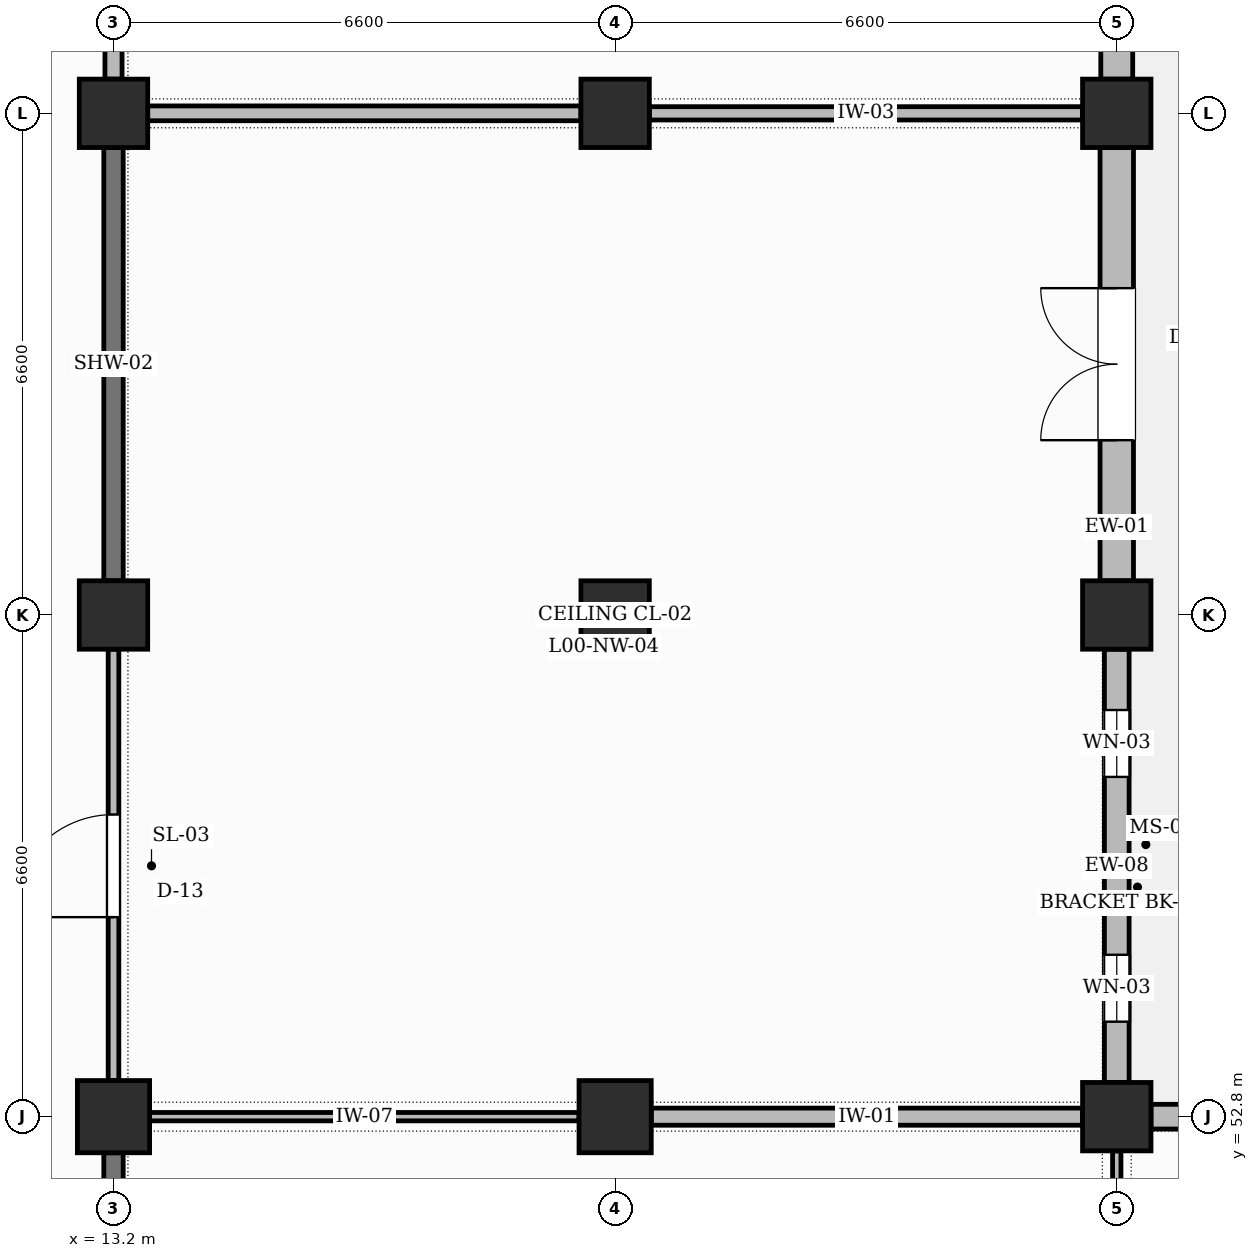
"""IFC4 building model, lengths in metres.
Left out: names, types, materials, properties, quantities, classifications, styles, units other than length and angle.
Written with IfcOpenShell. Run it as: python <this file> out.ifc"""

import sys

from ifc_helpers import new_model, si_unit, direction, frame, frame_2d, origin, origin_2d, place, context, subcontext, project, spatial, rectangle, extrude, element, fill, save


model = new_model("IFC4")
c1 = context("Model", 3, precision=1e-05, world=origin(), true_north=direction((0.0, 1.0)))
c2 = subcontext(c1, "Body", "Model", "MODEL_VIEW")
j1 = project(units=[si_unit("LENGTHUNIT", "METRE"), si_unit("PLANEANGLEUNIT", "RADIAN")], contexts=[c1])
p1 = place(None, origin())
s1 = spatial("IfcSite", under=j1, at=p1, CompositionType="ELEMENT")
p2 = place(p1, origin())
s2 = spatial("IfcBuilding", under=s1, at=p2, CompositionType="ELEMENT")
p3 = place(p2, origin())
s3 = spatial("IfcBuildingStorey", under=s2, at=p3, CompositionType="ELEMENT", Elevation=0.0)
p4 = place(p3, frame((13.2, 52.8, 0.0), z_axis=(0.0, 0.0, 1.0), x_axis=(1.0, 0.0, 0.0)))
e1 = element("IfcColumn", 1, at=p4, inside=s3, PredefinedType="COLUMN", context=c2, shape_type="SweptSolid", body=[
    extrude(rectangle(XDim=0.95, YDim=0.95, at=origin_2d()), origin(), (0.0, 0.0, 1.0), 5.4),
])
for number, where, z_axis, x_axis in (
    (2, (13.2, 59.4, 0.0), (0.0, 0.0, 1.0), (1.0, 0.0, 0.0)),
    (3, (13.2, 66.0, 0.0), (0.0, 0.0, 1.0), (1.0, 0.0, 0.0)),
):
    element("IfcColumn", number, at=place(p3, frame(where, z_axis=z_axis, x_axis=x_axis)), inside=s3, PredefinedType="COLUMN", context=c2, shape_type="SweptSolid", body=[
        extrude(rectangle(XDim=0.9, YDim=0.9, at=origin_2d()), origin(), (0.0, 0.0, 1.0), 5.4),
    ])
p5 = place(p3, frame((19.8, 52.8, 0.0), z_axis=(0.0, 0.0, 1.0), x_axis=(1.0, 0.0, 0.0)))
e4 = element("IfcColumn", 4, at=p5, inside=s3, PredefinedType="COLUMN", context=c2, shape_type="SweptSolid", body=[
    extrude(rectangle(XDim=0.95, YDim=0.95, at=origin_2d()), origin(), (0.0, 0.0, 1.0), 5.4),
])
for number, where, z_axis, x_axis in (
    (5, (19.8, 59.4, 0.0), (0.0, 0.0, 1.0), (1.0, 0.0, 0.0)),
    (6, (19.8, 66.0, 0.0), (0.0, 0.0, 1.0), (1.0, 0.0, 0.0)),
    (7, (26.4, 52.8, 0.0), (0.0, 0.0, 1.0), (1.0, 0.0, 0.0)),
    (8, (26.4, 59.4, 0.0), (0.0, 0.0, 1.0), (1.0, 0.0, 0.0)),
    (9, (26.4, 66.0, 0.0), (0.0, 0.0, 1.0), (1.0, 0.0, 0.0)),
):
    element("IfcColumn", number, at=place(p3, frame(where, z_axis=z_axis, x_axis=x_axis)), inside=s3, PredefinedType="COLUMN", context=c2, shape_type="SweptSolid", body=[
        extrude(rectangle(XDim=0.9, YDim=0.9, at=origin_2d()), origin(), (0.0, 0.0, 1.0), 5.4),
    ])
p6 = place(p3, frame((26.4, 53.25, 0.0), z_axis=(0.0, 0.0, 1.0), x_axis=(0.0, 1.0, 0.0)))
e10 = element("IfcWall", 10, at=p6, inside=s3, PredefinedType="SOLIDWALL", context=c2, shape_type="SweptSolid", body=[
    extrude(rectangle(XDim=5.7, YDim=0.325, at=frame_2d((2.85, 0.0))), origin(), (0.0, 0.0, 1.0), 4.45),
])
p7 = place(p6, frame((0.8, 0.0, 0.95)))
e11 = element("IfcOpeningElement", 11, at=p7, cuts=e10, PredefinedType="OPENING", context=c2, shape_type="SweptSolid", body=[
    extrude(rectangle(XDim=0.88, YDim=1.74, at=frame_2d((0.44, 0.87))), frame((0.0, 0.172, 0.0), z_axis=(0.0, -1.0, 0.0), x_axis=(1.0, 0.0, 0.0)), (0.0, 0.0, 1.0), 0.345),
])
p8 = place(p6, frame((4.02, 0.0, 0.95)))
e12 = element("IfcOpeningElement", 12, at=p8, cuts=e10, PredefinedType="OPENING", context=c2, shape_type="SweptSolid", body=[
    extrude(rectangle(XDim=0.88, YDim=1.74, at=frame_2d((0.44, 0.87))), frame((0.0, 0.172, 0.0), z_axis=(0.0, -1.0, 0.0), x_axis=(1.0, 0.0, 0.0)), (0.0, 0.0, 1.0), 0.345),
])
p9 = place(p3, frame((26.4, 59.85, 0.0), z_axis=(0.0, 0.0, 1.0), x_axis=(0.0, 1.0, 0.0)))
e13 = element("IfcWall", 13, at=p9, inside=s3, PredefinedType="SOLIDWALL", context=c2, shape_type="SweptSolid", body=[
    extrude(rectangle(XDim=5.7, YDim=0.44, at=frame_2d((2.85, 0.0))), origin(), (0.0, 0.0, 1.0), 4.45),
])
p10 = place(p9, frame((1.85, 0.0, 0.0)))
e14 = element("IfcOpeningElement", 14, at=p10, cuts=e13, PredefinedType="OPENING", context=c2, shape_type="SweptSolid", body=[
    extrude(rectangle(XDim=2.0, YDim=2.5, at=frame_2d((1.0, 1.25))), frame((0.0, 0.23, 0.0), z_axis=(0.0, -1.0, 0.0), x_axis=(1.0, 0.0, 0.0)), (0.0, 0.0, 1.0), 0.46),
])
p11 = place(p3, frame((26.4, 66.45, 0.0), z_axis=(0.0, 0.0, 1.0), x_axis=(0.0, 1.0, 0.0)))
e15 = element("IfcWall", 15, at=p11, inside=s3, PredefinedType="SOLIDWALL", context=c2, shape_type="SweptSolid", body=[
    extrude(rectangle(XDim=5.7, YDim=0.42, at=frame_2d((2.85, 0.0))), origin(), (0.0, 0.0, 1.0), 4.45),
])
p12 = place(p11, frame((0.8, 0.0, 0.95)))
e16 = element("IfcOpeningElement", 16, at=p12, cuts=e15, PredefinedType="OPENING", context=c2, shape_type="SweptSolid", body=[
    extrude(rectangle(XDim=0.88, YDim=1.96, at=frame_2d((0.44, 0.98))), frame((0.0, 0.22, 0.0), z_axis=(0.0, -1.0, 0.0), x_axis=(1.0, 0.0, 0.0)), (0.0, 0.0, 1.0), 0.44),
])
p13 = place(p11, frame((4.02, 0.0, 0.95)))
e17 = element("IfcOpeningElement", 17, at=p13, cuts=e15, PredefinedType="OPENING", context=c2, shape_type="SweptSolid", body=[
    extrude(rectangle(XDim=0.88, YDim=1.96, at=frame_2d((0.44, 0.98))), frame((0.0, 0.22, 0.0), z_axis=(0.0, -1.0, 0.0), x_axis=(1.0, 0.0, 0.0)), (0.0, 0.0, 1.0), 0.44),
])
p14 = place(p3, frame((26.85, 52.8, 0.0), z_axis=(0.0, 0.0, 1.0), x_axis=(1.0, 0.0, 0.0)))
e18 = element("IfcWall", 18, at=p14, inside=s3, PredefinedType="SOLIDWALL", context=c2, shape_type="SweptSolid", body=[
    extrude(rectangle(XDim=5.7, YDim=0.325, at=frame_2d((2.85, 0.0))), origin(), (0.0, 0.0, 1.0), 4.45),
])
p15 = place(p14, frame((2.09, 0.0, 0.95)))
e19 = element("IfcOpeningElement", 19, at=p15, cuts=e18, PredefinedType="OPENING", context=c2, shape_type="SweptSolid", body=[
    extrude(rectangle(XDim=1.52, YDim=1.74, at=frame_2d((0.76, 0.87))), frame((0.0, 0.172, 0.0), z_axis=(0.0, -1.0, 0.0), x_axis=(1.0, 0.0, 0.0)), (0.0, 0.0, 1.0), 0.345),
])
p16 = place(p3, frame((13.2, 46.675, 0.0), z_axis=(0.0, 0.0, 1.0), x_axis=(0.0, 1.0, 0.0)))
e20 = element("IfcWall", 20, at=p16, inside=s3, PredefinedType="SHEAR", context=c2, shape_type="SweptSolid", body=[
    extrude(rectangle(XDim=5.65, YDim=0.255, at=frame_2d((2.825, 0.0))), origin(), (0.0, 0.0, 1.0), 4.3),
])
p17 = place(p3, frame((13.2, 53.275, 0.0), z_axis=(0.0, 0.0, 1.0), x_axis=(0.0, 1.0, 0.0)))
e21 = element("IfcWall", 21, at=p17, inside=s3, PredefinedType="PARTITIONING", context=c2, shape_type="SweptSolid", body=[
    extrude(rectangle(XDim=5.675, YDim=0.14, at=frame_2d((2.837, 0.0))), origin(), (0.0, 0.0, 1.0), 4.3),
])
p18 = place(p17, frame((2.15, 0.0, 0.0)))
e22 = element("IfcOpeningElement", 22, at=p18, cuts=e21, PredefinedType="OPENING", context=c2, shape_type="SweptSolid", body=[
    extrude(rectangle(XDim=1.35, YDim=2.3, at=frame_2d((0.675, 1.15))), frame((0.0, 0.08, 0.0), z_axis=(0.0, -1.0, 0.0), x_axis=(1.0, 0.0, 0.0)), (0.0, 0.0, 1.0), 0.16),
])
p19 = place(p3, frame((13.2, 59.85, 0.0), z_axis=(0.0, 0.0, 1.0), x_axis=(0.0, 1.0, 0.0)))
e23 = element("IfcWall", 23, at=p19, inside=s3, PredefinedType="SHEAR", context=c2, shape_type="SweptSolid", body=[
    extrude(rectangle(XDim=5.7, YDim=0.255, at=frame_2d((2.85, 0.0))), origin(), (0.0, 0.0, 1.0), 4.3),
])
p20 = place(p3, frame((13.2, 66.45, 0.0), z_axis=(0.0, 0.0, 1.0), x_axis=(0.0, 1.0, 0.0)))
e24 = element("IfcWall", 24, at=p20, inside=s3, PredefinedType="PARTITIONING", context=c2, shape_type="SweptSolid", body=[
    extrude(rectangle(XDim=5.7, YDim=0.225, at=frame_2d((2.85, 0.0))), origin(), (0.0, 0.0, 1.0), 4.3),
])
p21 = place(p20, frame((2.26, 0.0, 0.0)))
e25 = element("IfcOpeningElement", 25, at=p21, cuts=e24, PredefinedType="OPENING", context=c2, shape_type="SweptSolid", body=[
    extrude(rectangle(XDim=1.18, YDim=2.2, at=frame_2d((0.59, 1.1))), frame((0.0, 0.123, 0.0), z_axis=(0.0, -1.0, 0.0), x_axis=(1.0, 0.0, 0.0)), (0.0, 0.0, 1.0), 0.245),
])
p22 = place(p3, frame((13.675, 52.8, 0.0), z_axis=(0.0, 0.0, 1.0), x_axis=(1.0, 0.0, 0.0)))
e26 = element("IfcWall", 26, at=p22, inside=s3, PredefinedType="PARTITIONING", context=c2, shape_type="SweptSolid", body=[
    extrude(rectangle(XDim=5.65, YDim=0.11, at=frame_2d((2.825, 0.0))), origin(), (0.0, 0.0, 1.0), 4.2),
])
p23 = place(p3, frame((13.65, 66.0, 0.0), z_axis=(0.0, 0.0, 1.0), x_axis=(1.0, 0.0, 0.0)))
e27 = element("IfcWall", 27, at=p23, inside=s3, PredefinedType="PARTITIONING", context=c2, shape_type="SweptSolid", body=[
    extrude(rectangle(XDim=5.7, YDim=0.195, at=frame_2d((2.85, 0.0))), origin(), (0.0, 0.0, 1.0), 4.2),
])
p24 = place(p3, frame((26.4, 46.65, 0.0), z_axis=(0.0, 0.0, 1.0), x_axis=(0.0, 1.0, 0.0)))
e28 = element("IfcWall", 28, at=p24, inside=s3, PredefinedType="PARTITIONING", context=c2, shape_type="SweptSolid", body=[
    extrude(rectangle(XDim=5.7, YDim=0.11, at=frame_2d((2.85, 0.0))), origin(), (0.0, 0.0, 1.0), 4.3),
])
p25 = place(p3, frame((20.275, 52.8, 0.0), z_axis=(0.0, 0.0, 1.0), x_axis=(1.0, 0.0, 0.0)))
e29 = element("IfcWall", 29, at=p25, inside=s3, PredefinedType="PARTITIONING", context=c2, shape_type="SweptSolid", body=[
    extrude(rectangle(XDim=5.675, YDim=0.225, at=frame_2d((2.837, 0.0))), origin(), (0.0, 0.0, 1.0), 4.3),
])
p26 = place(p3, frame((20.25, 66.0, 0.0), z_axis=(0.0, 0.0, 1.0), x_axis=(1.0, 0.0, 0.0)))
e30 = element("IfcWall", 30, at=p26, inside=s3, PredefinedType="PARTITIONING", context=c2, shape_type="SweptSolid", body=[
    extrude(rectangle(XDim=5.7, YDim=0.175, at=frame_2d((2.85, 0.0))), origin(), (0.0, 0.0, 1.0), 4.3),
])
p27 = place(p7, origin())
e31 = element("IfcWindow", 31, at=p27, inside=s3, PartitioningType="SINGLE_PANEL", PredefinedType="WINDOW", context=c2, shape_type="SweptSolid", body=[
    extrude(rectangle(XDim=0.88, YDim=1.74, at=frame_2d((0.44, 0.87))), frame((0.0, 0.03, 0.0), z_axis=(0.0, -1.0, 0.0), x_axis=(1.0, 0.0, 0.0)), (0.0, 0.0, 1.0), 0.06),
])
fill(e11, e31)
p28 = place(p8, origin())
e32 = element("IfcWindow", 32, at=p28, inside=s3, PartitioningType="SINGLE_PANEL", PredefinedType="WINDOW", context=c2, shape_type="SweptSolid", body=[
    extrude(rectangle(XDim=0.88, YDim=1.74, at=frame_2d((0.44, 0.87))), frame((0.0, 0.03, 0.0), z_axis=(0.0, -1.0, 0.0), x_axis=(1.0, 0.0, 0.0)), (0.0, 0.0, 1.0), 0.06),
])
fill(e12, e32)
p29 = place(p10, origin())
e33 = element("IfcDoor", 33, at=p29, inside=s3, OperationType="DOUBLE_DOOR_SINGLE_SWING", PredefinedType="DOOR", context=c2, shape_type="SweptSolid", body=[
    extrude(rectangle(XDim=2.0, YDim=2.5, at=frame_2d((1.0, 1.25))), frame((0.0, 0.025, 0.0), z_axis=(0.0, -1.0, 0.0), x_axis=(1.0, 0.0, 0.0)), (0.0, 0.0, 1.0), 0.05),
])
fill(e14, e33)
p30 = place(p18, origin())
e34 = element("IfcDoor", 34, at=p30, inside=s3, OperationType="SINGLE_SWING_LEFT", PredefinedType="DOOR", context=c2, shape_type="SweptSolid", body=[
    extrude(rectangle(XDim=1.35, YDim=2.3, at=frame_2d((0.675, 1.15))), frame((0.0, 0.025, 0.0), z_axis=(0.0, -1.0, 0.0), x_axis=(1.0, 0.0, 0.0)), (0.0, 0.0, 1.0), 0.05),
])
fill(e22, e34)
save(model, sys.argv[1])
